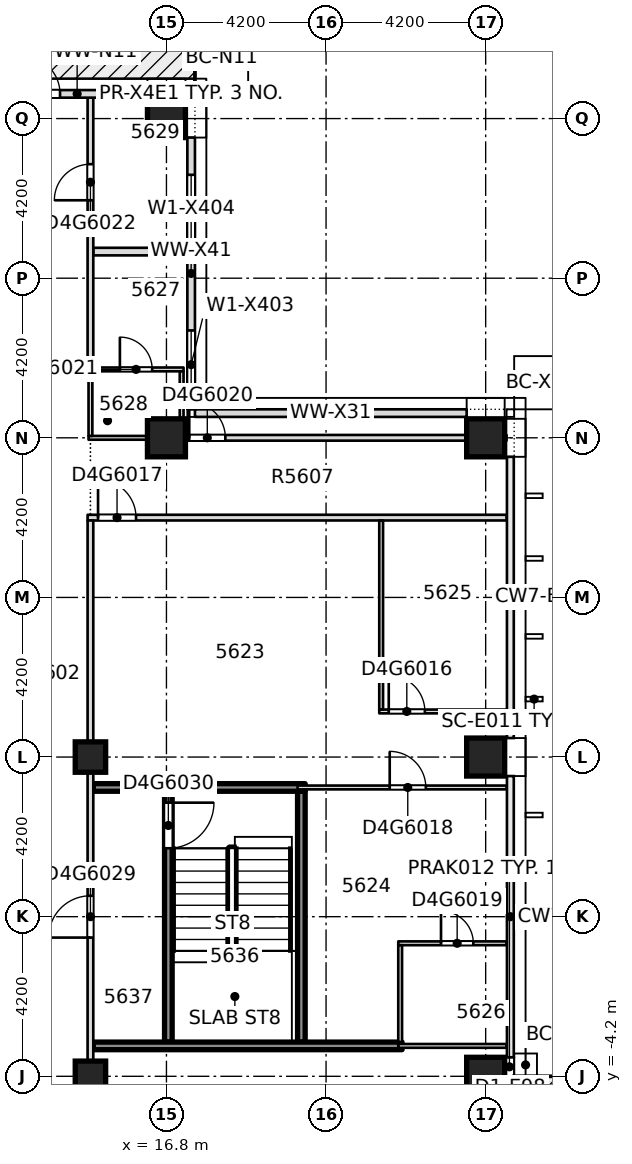
"""IFC4 building model, lengths in metres.
Left out: names, types, materials, properties, quantities, classifications, styles, units other than length and angle.
Written with IfcOpenShell. Run it as: python <this file> out.ifc"""

import sys

from ifc_helpers import new_model, si_unit, direction, frame, frame_2d, origin, origin_2d, place, context, subcontext, project, spatial, rectangle, extrude, element, fill, save


model = new_model("IFC4")
c1 = context("Model", 3, precision=1e-05, world=origin(), true_north=direction((0.0, 1.0)))
c2 = subcontext(c1, "Body", "Model", "MODEL_VIEW")
j1 = project(units=[si_unit("LENGTHUNIT", "METRE"), si_unit("PLANEANGLEUNIT", "RADIAN")], contexts=[c1])
p1 = place(None, origin())
s1 = spatial("IfcSite", under=j1, at=p1, CompositionType="ELEMENT")
p2 = place(p1, origin())
s2 = spatial("IfcBuilding", under=s1, at=p2, CompositionType="ELEMENT")
p3 = place(p2, frame((0.0, 0.0, 213.5)))
s3 = spatial("IfcBuildingStorey", under=s2, at=p3, CompositionType="ELEMENT", Elevation=213.5)
for number, where, z_axis, x_axis in (
    (1, (25.2, -4.2, -0.4), (0.0, 0.0, 1.0), (1.0, 0.0, 0.0)),
    (2, (25.2, 4.2, -0.4), (0.0, 0.0, 1.0), (1.0, 0.0, 0.0)),
):
    element("IfcColumn", number, at=place(p3, frame(where, z_axis=z_axis, x_axis=x_axis)), inside=s3, PredefinedType="COLUMN", context=c2, shape_type="SweptSolid", body=[
        extrude(rectangle(XDim=1.0, YDim=1.0, at=origin_2d()), origin(), (0.0, 0.0, 1.0), 3.4),
    ])
p4 = place(p3, frame((16.8, 12.6, -0.4), z_axis=(0.0, 0.0, 1.0), x_axis=(1.0, 0.0, 0.0)))
e3 = element("IfcColumn", 3, at=p4, inside=s3, PredefinedType="COLUMN", context=c2, shape_type="SweptSolid", body=[
    extrude(rectangle(XDim=1.0, YDim=1.0, at=origin_2d()), origin(), (0.0, 0.0, 1.0), 3.85),
])
for number, where, z_axis, x_axis in (
    (4, (25.2, 12.6, -0.4), (0.0, 0.0, 1.0), (1.0, 0.0, 0.0)),
    (5, (16.8, 21.0, -0.4), (0.0, 0.0, 1.0), (1.0, 0.0, 0.0)),
):
    element("IfcColumn", number, at=place(p3, frame(where, z_axis=z_axis, x_axis=x_axis)), inside=s3, PredefinedType="COLUMN", context=c2, shape_type="SweptSolid", body=[
        extrude(rectangle(XDim=1.0, YDim=1.0, at=origin_2d()), origin(), (0.0, 0.0, 1.0), 3.4),
    ])
for number, where, z_axis, x_axis in (
    (6, (14.8, -4.2, -0.4), (0.0, 0.0, 1.0), (1.0, 0.0, 0.0)),
    (7, (14.8, 4.2, -0.4), (0.0, 0.0, 1.0), (1.0, 0.0, 0.0)),
):
    element("IfcColumn", number, at=place(p3, frame(where, z_axis=z_axis, x_axis=x_axis)), inside=s3, PredefinedType="COLUMN", context=c2, shape_type="SweptSolid", body=[
        extrude(rectangle(XDim=0.8, YDim=0.8, at=origin_2d()), origin(), (0.0, 0.0, 1.0), 3.85),
    ])
p5 = place(p3, frame((22.9, -3.4, 0.0), z_axis=(0.0, 0.0, 1.0), x_axis=(1.0, 0.0, 0.0)))
e8 = element("IfcWall", 8, at=p5, inside=s3, PredefinedType="PARTITIONING", context=c2, shape_type="SweptSolid", body=[
    extrude(rectangle(XDim=2.85, YDim=0.1, at=frame_2d((1.425, 0.0))), origin(), (0.0, 0.0, 1.0), 3.0),
])
p6 = place(p3, frame((22.9, -0.7, 0.0), z_axis=(0.0, 0.0, 1.0), x_axis=(1.0, 0.0, 0.0)))
e9 = element("IfcWall", 9, at=p6, inside=s3, PredefinedType="PARTITIONING", context=c2, shape_type="SweptSolid", body=[
    extrude(rectangle(XDim=2.85, YDim=0.1, at=frame_2d((1.425, 0.0))), origin(), (0.0, 0.0, 1.0), 3.0),
])
p7 = place(p6, frame((1.125, 0.0, 0.0)))
e10 = element("IfcOpeningElement", 10, at=p7, cuts=e9, PredefinedType="OPENING", context=c2, shape_type="SweptSolid", body=[
    extrude(rectangle(XDim=0.85, YDim=2.1, at=frame_2d((0.425, 1.05))), frame((0.0, 0.06, 0.0), z_axis=(0.0, -1.0, 0.0), x_axis=(1.0, 0.0, 0.0)), (0.0, 0.0, 1.0), 0.12),
])
p8 = place(p3, frame((20.25, 3.4, 0.0), z_axis=(0.0, 0.0, 1.0), x_axis=(1.0, 0.0, 0.0)))
e11 = element("IfcWall", 11, at=p8, inside=s3, PredefinedType="PARTITIONING", context=c2, shape_type="SweptSolid", body=[
    extrude(rectangle(XDim=5.5, YDim=0.1, at=frame_2d((2.75, 0.0))), origin(), (0.0, 0.0, 1.0), 3.0),
])
p9 = place(p8, frame((2.425, 0.0, 0.0)))
e12 = element("IfcOpeningElement", 12, at=p9, cuts=e11, PredefinedType="OPENING", context=c2, shape_type="SweptSolid", body=[
    extrude(rectangle(XDim=0.95, YDim=2.1, at=frame_2d((0.475, 1.05))), frame((0.0, 0.06, 0.0), z_axis=(0.0, -1.0, 0.0), x_axis=(1.0, 0.0, 0.0)), (0.0, 0.0, 1.0), 0.12),
])
p10 = place(p3, frame((22.4, 5.4, 0.0), z_axis=(0.0, 0.0, 1.0), x_axis=(1.0, 0.0, 0.0)))
e13 = element("IfcWall", 13, at=p10, inside=s3, PredefinedType="PARTITIONING", context=c2, shape_type="SweptSolid", body=[
    extrude(rectangle(XDim=3.35, YDim=0.1, at=frame_2d((1.675, 0.0))), origin(), (0.0, 0.0, 1.0), 3.0),
])
p11 = place(p10, frame((0.25, 0.0, 0.0)))
e14 = element("IfcOpeningElement", 14, at=p11, cuts=e13, PredefinedType="OPENING", context=c2, shape_type="SweptSolid", body=[
    extrude(rectangle(XDim=0.95, YDim=2.1, at=frame_2d((0.475, 1.05))), frame((0.0, 0.06, 0.0), z_axis=(0.0, -1.0, 0.0), x_axis=(1.0, 0.0, 0.0)), (0.0, 0.0, 1.0), 0.12),
])
p12 = place(p3, frame((14.725, 10.5, 0.0), z_axis=(0.0, 0.0, 1.0), x_axis=(1.0, 0.0, 0.0)))
e15 = element("IfcWall", 15, at=p12, inside=s3, PredefinedType="PARTITIONING", context=c2, shape_type="SweptSolid", body=[
    extrude(rectangle(XDim=11.025, YDim=0.15, at=frame_2d((5.512, 0.0))), origin(), (0.0, 0.0, 1.0), 3.0),
])
p13 = place(p12, frame((0.275, 0.0, 0.0)))
e16 = element("IfcOpeningElement", 16, at=p13, cuts=e15, PredefinedType="OPENING", context=c2, shape_type="SweptSolid", body=[
    extrude(rectangle(XDim=1.0, YDim=2.1, at=frame_2d((0.5, 1.05))), frame((0.0, 0.085, 0.0), z_axis=(0.0, -1.0, 0.0), x_axis=(1.0, 0.0, 0.0)), (0.0, 0.0, 1.0), 0.17),
])
p14 = place(p3, frame((14.75, 12.6, 0.0), z_axis=(0.0, 0.0, 1.0), x_axis=(1.0, 0.0, 0.0)))
e17 = element("IfcWall", 17, at=p14, inside=s3, PredefinedType="PARTITIONING", context=c2, shape_type="SweptSolid", body=[
    extrude(rectangle(XDim=2.5, YDim=0.1, at=frame_2d((1.25, 0.0))), origin(), (0.0, 0.0, 1.0), 3.0),
])
p15 = place(p3, frame((17.15, 12.6, 0.0), z_axis=(0.0, 0.0, 1.0), x_axis=(1.0, 0.0, 0.0)))
e18 = element("IfcWall", 18, at=p15, inside=s3, PredefinedType="PARTITIONING", context=c2, shape_type="SweptSolid", body=[
    extrude(rectangle(XDim=0.15, YDim=0.15, at=frame_2d((0.075, 0.0))), origin(), (0.0, 0.0, 1.0), 3.0),
])
p16 = place(p3, frame((14.725, 14.4, 0.0), z_axis=(0.0, 0.0, 1.0), x_axis=(1.0, 0.0, 0.0)))
e19 = element("IfcWall", 19, at=p16, inside=s3, PredefinedType="PARTITIONING", context=c2, shape_type="SweptSolid", body=[
    extrude(rectangle(XDim=2.525, YDim=0.1, at=frame_2d((1.262, 0.0))), origin(), (0.0, 0.0, 1.0), 3.0),
])
p17 = place(p16, frame((0.85, 0.0, 0.0)))
e20 = element("IfcOpeningElement", 20, at=p17, cuts=e19, PredefinedType="OPENING", context=c2, shape_type="SweptSolid", body=[
    extrude(rectangle(XDim=0.85, YDim=2.1, at=frame_2d((0.425, 1.05))), frame((0.0, 0.06, 0.0), z_axis=(0.0, -1.0, 0.0), x_axis=(1.0, 0.0, 0.0)), (0.0, 0.0, 1.0), 0.12),
])
p18 = place(p3, frame((14.875, 17.5, 0.0), z_axis=(0.0, 0.0, 1.0), x_axis=(1.0, 0.0, 0.0)))
e21 = element("IfcWall", 21, at=p18, inside=s3, PredefinedType="PARTITIONING", context=c2, shape_type="SweptSolid", body=[
    extrude(rectangle(XDim=2.475, YDim=0.2, at=frame_2d((1.238, 0.0))), origin(), (0.0, 0.0, 1.0), 3.0),
])
p19 = place(p3, frame((14.8, -8.325, 0.0), z_axis=(0.0, 0.0, 1.0), x_axis=(0.0, 1.0, 0.0)))
e22 = element("IfcWall", 22, at=p19, inside=s3, PredefinedType="PARTITIONING", context=c2, shape_type="SweptSolid", body=[
    extrude(rectangle(XDim=18.75, YDim=0.15, at=frame_2d((9.375, 0.0))), origin(), (0.0, 0.0, 1.0), 3.0),
])
p20 = place(p19, frame((7.775, 0.0, 0.0)))
e23 = element("IfcOpeningElement", 23, at=p20, cuts=e22, PredefinedType="OPENING", context=c2, shape_type="SweptSolid", body=[
    extrude(rectangle(XDim=1.1, YDim=2.1, at=frame_2d((0.55, 1.05))), frame((0.0, 0.085, 0.0), z_axis=(0.0, -1.0, 0.0), x_axis=(1.0, 0.0, 0.0)), (0.0, 0.0, 1.0), 0.17),
])
p21 = place(p3, frame((14.8, 12.65, 0.0), z_axis=(0.0, 0.0, 1.0), x_axis=(0.0, 1.0, 0.0)))
e24 = element("IfcWall", 24, at=p21, inside=s3, PredefinedType="PARTITIONING", context=c2, shape_type="SweptSolid", body=[
    extrude(rectangle(XDim=1.7, YDim=0.1, at=frame_2d((0.85, 0.0))), origin(), (0.0, 0.0, 1.0), 3.0),
])
p22 = place(p3, frame((14.8, 14.45, 0.0), z_axis=(0.0, 0.0, 1.0), x_axis=(0.0, 1.0, 0.0)))
e25 = element("IfcWall", 25, at=p22, inside=s3, PredefinedType="PARTITIONING", context=c2, shape_type="SweptSolid", body=[
    extrude(rectangle(XDim=7.1, YDim=0.15, at=frame_2d((3.55, 0.0))), origin(), (0.0, 0.0, 1.0), 3.0),
])
p23 = place(p22, frame((4.4, 0.0, 0.0)))
e26 = element("IfcOpeningElement", 26, at=p23, cuts=e25, PredefinedType="OPENING", context=c2, shape_type="SweptSolid", body=[
    extrude(rectangle(XDim=0.95, YDim=2.1, at=frame_2d((0.475, 1.05))), frame((0.0, 0.085, 0.0), z_axis=(0.0, -1.0, 0.0), x_axis=(1.0, 0.0, 0.0)), (0.0, 0.0, 1.0), 0.17),
])
p24 = place(p3, frame((16.85, -3.3, 0.0), z_axis=(0.0, 0.0, 1.0), x_axis=(0.0, 1.0, 0.0)))
e27 = element("IfcWall", 27, at=p24, inside=s3, PredefinedType="SOLIDWALL", context=c2, shape_type="SweptSolid", body=[
    extrude(rectangle(XDim=6.6, YDim=0.2, at=frame_2d((3.3, 0.0))), origin(), (0.0, 0.0, 1.0), 3.0),
])
p25 = place(p24, frame((5.1, 0.0, 0.0)))
e28 = element("IfcOpeningElement", 28, at=p25, cuts=e27, PredefinedType="OPENING", context=c2, shape_type="SweptSolid", body=[
    extrude(rectangle(XDim=1.2, YDim=2.1, at=frame_2d((0.6, 1.05))), frame((0.0, 0.11, 0.0), z_axis=(0.0, -1.0, 0.0), x_axis=(1.0, 0.0, 0.0)), (0.0, 0.0, 1.0), 0.22),
])
p26 = place(p3, frame((17.2, 12.675, 0.0), z_axis=(0.0, 0.0, 1.0), x_axis=(0.0, 1.0, 0.0)))
e29 = element("IfcWall", 29, at=p26, inside=s3, PredefinedType="PARTITIONING", context=c2, shape_type="SweptSolid", body=[
    extrude(rectangle(XDim=1.675, YDim=0.1, at=frame_2d((0.837, 0.0))), origin(), (0.0, 0.0, 1.0), 3.0),
])
p27 = place(p3, frame((20.35, -3.3, 0.0), z_axis=(0.0, 0.0, 1.0), x_axis=(0.0, 1.0, 0.0)))
e30 = element("IfcWall", 30, at=p27, inside=s3, PredefinedType="SOLIDWALL", context=c2, shape_type="SweptSolid", body=[
    extrude(rectangle(XDim=6.6, YDim=0.2, at=frame_2d((3.3, 0.0))), origin(), (0.0, 0.0, 1.0), 3.0),
])
p28 = place(p3, frame((22.45, 5.45, 0.0), z_axis=(0.0, 0.0, 1.0), x_axis=(0.0, 1.0, 0.0)))
e31 = element("IfcWall", 31, at=p28, inside=s3, PredefinedType="PARTITIONING", context=c2, shape_type="SweptSolid", body=[
    extrude(rectangle(XDim=4.975, YDim=0.1, at=frame_2d((2.488, 0.0))), origin(), (0.0, 0.0, 1.0), 3.0),
])
p29 = place(p3, frame((22.95, -3.3, 0.0), z_axis=(0.0, 0.0, 1.0), x_axis=(0.0, 1.0, 0.0)))
e32 = element("IfcWall", 32, at=p29, inside=s3, PredefinedType="PARTITIONING", context=c2, shape_type="SweptSolid", body=[
    extrude(rectangle(XDim=2.55, YDim=0.1, at=frame_2d((1.275, 0.0))), origin(), (0.0, 0.0, 1.0), 3.0),
])
p30 = place(p3, frame((24.7, 13.25, 0.0), z_axis=(0.0, 0.0, 1.0), x_axis=(-1.0, 0.0, 0.0)))
e33 = element("IfcWall", 33, at=p30, inside=s3, PredefinedType="STANDARD", context=c2, shape_type="SweptSolid", body=[
    extrude(rectangle(XDim=7.15, YDim=0.2, at=frame_2d((3.575, 0.0))), origin(), (0.0, 0.0, 1.0), 3.0),
])
p31 = place(p3, frame((17.45, 13.35, 0.0), z_axis=(0.0, 0.0, 1.0), x_axis=(0.0, 1.0, 0.0)))
e34 = element("IfcWall", 34, at=p31, inside=s3, PredefinedType="STANDARD", context=c2, shape_type="SweptSolid", body=[
    extrude(rectangle(XDim=7.15, YDim=0.2, at=frame_2d((3.575, 0.0))), origin(), (0.0, 0.0, 1.0), 3.0),
])
p32 = place(p31, frame((0.275, 0.0, 0.2)))
e35 = element("IfcOpeningElement", 35, at=p32, cuts=e34, PredefinedType="OPENING", context=c2, shape_type="SweptSolid", body=[
    extrude(rectangle(XDim=1.8, YDim=2.65, at=frame_2d((0.9, 1.325))), frame((0.0, 0.11, 0.0), z_axis=(0.0, -1.0, 0.0), x_axis=(1.0, 0.0, 0.0)), (0.0, 0.0, 1.0), 0.22),
])
p33 = place(p31, frame((4.37, 0.0, 0.2)))
e36 = element("IfcOpeningElement", 36, at=p33, cuts=e34, PredefinedType="OPENING", context=c2, shape_type="SweptSolid", body=[
    extrude(rectangle(XDim=1.8, YDim=2.65, at=frame_2d((0.9, 1.325))), frame((0.0, 0.11, 0.0), z_axis=(0.0, -1.0, 0.0), x_axis=(1.0, 0.0, 0.0)), (0.0, 0.0, 1.0), 0.22),
])
p34 = place(p3, frame((16.3, 21.65, 0.0), z_axis=(0.0, 0.0, 1.0), x_axis=(-1.0, 0.0, 0.0)))
e37 = element("IfcWall", 37, at=p34, inside=s3, PredefinedType="STANDARD", context=c2, shape_type="SweptSolid", body=[
    extrude(rectangle(XDim=3.7, YDim=0.2, at=frame_2d((1.85, 0.0))), origin(), (0.0, 0.0, 1.0), 3.0),
])
p35 = place(p34, frame((2.3, 0.0, 0.0)))
e38 = element("IfcOpeningElement", 38, at=p35, cuts=e37, PredefinedType="OPENING", context=c2, shape_type="SweptSolid", body=[
    extrude(rectangle(XDim=1.0, YDim=2.4, at=frame_2d((0.5, 1.2))), frame((0.0, 0.11, 0.0), z_axis=(0.0, -1.0, 0.0), x_axis=(1.0, 0.0, 0.0)), (0.0, 0.0, 1.0), 0.22),
])
p36 = place(p3, frame((14.875, 3.4, 0.0), z_axis=(0.0, 0.0, 1.0), x_axis=(1.0, 0.0, 0.0)))
e39 = element("IfcWall", 39, at=p36, inside=s3, PredefinedType="SOLIDWALL", context=c2, shape_type="SweptSolid", body=[
    extrude(rectangle(XDim=5.575, YDim=0.2, at=frame_2d((2.788, 0.0))), origin(), (0.0, 0.0, 1.0), 3.0),
])
p37 = place(p3, frame((14.875, -3.4, 0.0), z_axis=(0.0, 0.0, 1.0), x_axis=(1.0, 0.0, 0.0)))
e40 = element("IfcWall", 40, at=p37, inside=s3, PredefinedType="SOLIDWALL", context=c2, shape_type="SweptSolid", body=[
    extrude(rectangle(XDim=8.125, YDim=0.2, at=frame_2d((4.062, 0.0))), origin(), (0.0, 0.0, 1.0), 3.0),
])
p38 = place(p3, frame((17.3, 12.6, 0.0), z_axis=(0.0, 0.0, 1.0), x_axis=(1.0, 0.0, 0.0)))
e41 = element("IfcWall", 41, at=p38, inside=s3, PredefinedType="PARTITIONING", context=c2, shape_type="SweptSolid", body=[
    extrude(rectangle(XDim=7.4, YDim=0.15, at=frame_2d((3.7, 0.0))), origin(), (0.0, 0.0, 1.0), 2.45),
])
p39 = place(p38, frame((0.1, 0.0, 0.0)))
e42 = element("IfcOpeningElement", 42, at=p39, cuts=e41, PredefinedType="OPENING", context=c2, shape_type="SweptSolid", body=[
    extrude(rectangle(XDim=0.95, YDim=2.1, at=frame_2d((0.475, 1.05))), frame((0.0, 0.085, 0.0), z_axis=(0.0, -1.0, 0.0), x_axis=(1.0, 0.0, 0.0)), (0.0, 0.0, 1.0), 0.17),
])
p40 = place(p3, frame((24.7, 12.6, 0.0), z_axis=(0.0, 0.0, 1.0), x_axis=(1.0, 0.0, 0.0)))
e43 = element("IfcWall", 43, at=p40, inside=s3, PredefinedType="PARTITIONING", context=c2, shape_type="SweptSolid", body=[
    extrude(rectangle(XDim=1.05, YDim=0.15, at=frame_2d((0.525, 0.0))), origin(), (0.0, 0.0, 1.0), 3.0),
])
p41 = place(p11, origin())
e44 = element("IfcDoor", 44, at=p41, inside=s3, OperationType="SINGLE_SWING_LEFT", PredefinedType="DOOR", context=c2, shape_type="SweptSolid", body=[
    extrude(rectangle(XDim=0.95, YDim=2.1, at=frame_2d((0.475, 1.05))), frame((0.0, 0.025, 0.0), z_axis=(0.0, -1.0, 0.0), x_axis=(1.0, 0.0, 0.0)), (0.0, 0.0, 1.0), 0.05),
])
fill(e14, e44)
p42 = place(p13, origin())
e45 = element("IfcDoor", 45, at=p42, inside=s3, OperationType="SINGLE_SWING_RIGHT", PredefinedType="DOOR", context=c2, shape_type="SweptSolid", body=[
    extrude(rectangle(XDim=1.0, YDim=2.1, at=frame_2d((0.5, 1.05))), frame((0.0, 0.025, 0.0), z_axis=(0.0, -1.0, 0.0), x_axis=(1.0, 0.0, 0.0)), (0.0, 0.0, 1.0), 0.05),
])
fill(e16, e45)
p43 = place(p9, origin())
e46 = element("IfcDoor", 46, at=p43, inside=s3, OperationType="SINGLE_SWING_LEFT", PredefinedType="DOOR", context=c2, shape_type="SweptSolid", body=[
    extrude(rectangle(XDim=0.95, YDim=2.1, at=frame_2d((0.475, 1.05))), frame((0.0, 0.025, 0.0), z_axis=(0.0, -1.0, 0.0), x_axis=(1.0, 0.0, 0.0)), (0.0, 0.0, 1.0), 0.05),
])
fill(e12, e46)
p44 = place(p7, origin())
e47 = element("IfcDoor", 47, at=p44, inside=s3, OperationType="SINGLE_SWING_RIGHT", PredefinedType="DOOR", context=c2, shape_type="SweptSolid", body=[
    extrude(rectangle(XDim=0.85, YDim=2.1, at=frame_2d((0.425, 1.05))), frame((0.0, 0.025, 0.0), z_axis=(0.0, -1.0, 0.0), x_axis=(1.0, 0.0, 0.0)), (0.0, 0.0, 1.0), 0.05),
])
fill(e10, e47)
p45 = place(p39, origin())
e48 = element("IfcDoor", 48, at=p45, inside=s3, OperationType="SINGLE_SWING_LEFT", PredefinedType="DOOR", context=c2, shape_type="SweptSolid", body=[
    extrude(rectangle(XDim=0.95, YDim=2.1, at=frame_2d((0.475, 1.05))), frame((0.0, 0.025, 0.0), z_axis=(0.0, -1.0, 0.0), x_axis=(1.0, 0.0, 0.0)), (0.0, 0.0, 1.0), 0.05),
])
fill(e42, e48)
p46 = place(p17, origin())
e49 = element("IfcDoor", 49, at=p46, inside=s3, OperationType="SINGLE_SWING_RIGHT", PredefinedType="DOOR", context=c2, shape_type="SweptSolid", body=[
    extrude(rectangle(XDim=0.85, YDim=2.1, at=frame_2d((0.425, 1.05))), frame((0.0, 0.025, 0.0), z_axis=(0.0, -1.0, 0.0), x_axis=(1.0, 0.0, 0.0)), (0.0, 0.0, 1.0), 0.05),
])
fill(e20, e49)
p47 = place(p23, origin())
e50 = element("IfcDoor", 50, at=p47, inside=s3, OperationType="SINGLE_SWING_RIGHT", PredefinedType="DOOR", context=c2, shape_type="SweptSolid", body=[
    extrude(rectangle(XDim=0.95, YDim=2.1, at=frame_2d((0.475, 1.05))), frame((0.0, 0.025, 0.0), z_axis=(0.0, -1.0, 0.0), x_axis=(1.0, 0.0, 0.0)), (0.0, 0.0, 1.0), 0.05),
])
fill(e26, e50)
p48 = place(p20, origin())
e51 = element("IfcDoor", 51, at=p48, inside=s3, OperationType="SINGLE_SWING_RIGHT", PredefinedType="DOOR", context=c2, shape_type="SweptSolid", body=[
    extrude(rectangle(XDim=1.1, YDim=2.1, at=frame_2d((0.55, 1.05))), frame((0.0, 0.025, 0.0), z_axis=(0.0, -1.0, 0.0), x_axis=(1.0, 0.0, 0.0)), (0.0, 0.0, 1.0), 0.05),
])
fill(e23, e51)
p49 = place(p25, origin())
e52 = element("IfcDoor", 52, at=p49, inside=s3, OperationType="SINGLE_SWING_LEFT", PredefinedType="DOOR", context=c2, shape_type="SweptSolid", body=[
    extrude(rectangle(XDim=1.2, YDim=2.1, at=frame_2d((0.6, 1.05))), frame((0.0, 0.025, 0.0), z_axis=(0.0, -1.0, 0.0), x_axis=(1.0, 0.0, 0.0)), (0.0, 0.0, 1.0), 0.05),
])
fill(e28, e52)
p50 = place(p32, origin())
e53 = element("IfcWindow", 53, at=p50, inside=s3, PartitioningType="SINGLE_PANEL", PredefinedType="WINDOW", context=c2, shape_type="SweptSolid", body=[
    extrude(rectangle(XDim=1.8, YDim=2.65, at=frame_2d((0.9, 1.325))), frame((0.0, 0.03, 0.0), z_axis=(0.0, -1.0, 0.0), x_axis=(1.0, 0.0, 0.0)), (0.0, 0.0, 1.0), 0.06),
])
fill(e35, e53)
p51 = place(p33, origin())
e54 = element("IfcWindow", 54, at=p51, inside=s3, PartitioningType="SINGLE_PANEL", PredefinedType="WINDOW", context=c2, shape_type="SweptSolid", body=[
    extrude(rectangle(XDim=1.8, YDim=2.65, at=frame_2d((0.9, 1.325))), frame((0.0, 0.03, 0.0), z_axis=(0.0, -1.0, 0.0), x_axis=(1.0, 0.0, 0.0)), (0.0, 0.0, 1.0), 0.06),
])
fill(e36, e54)
p52 = place(p35, origin())
e55 = element("IfcDoor", 55, at=p52, inside=s3, OperationType="SINGLE_SWING_LEFT", PredefinedType="DOOR", context=c2, shape_type="SweptSolid", body=[
    extrude(rectangle(XDim=1.0, YDim=2.4, at=frame_2d((0.5, 1.2))), frame((0.0, 0.025, 0.0), z_axis=(0.0, -1.0, 0.0), x_axis=(1.0, 0.0, 0.0)), (0.0, 0.0, 1.0), 0.05),
])
fill(e38, e55)
save(model, sys.argv[1])
